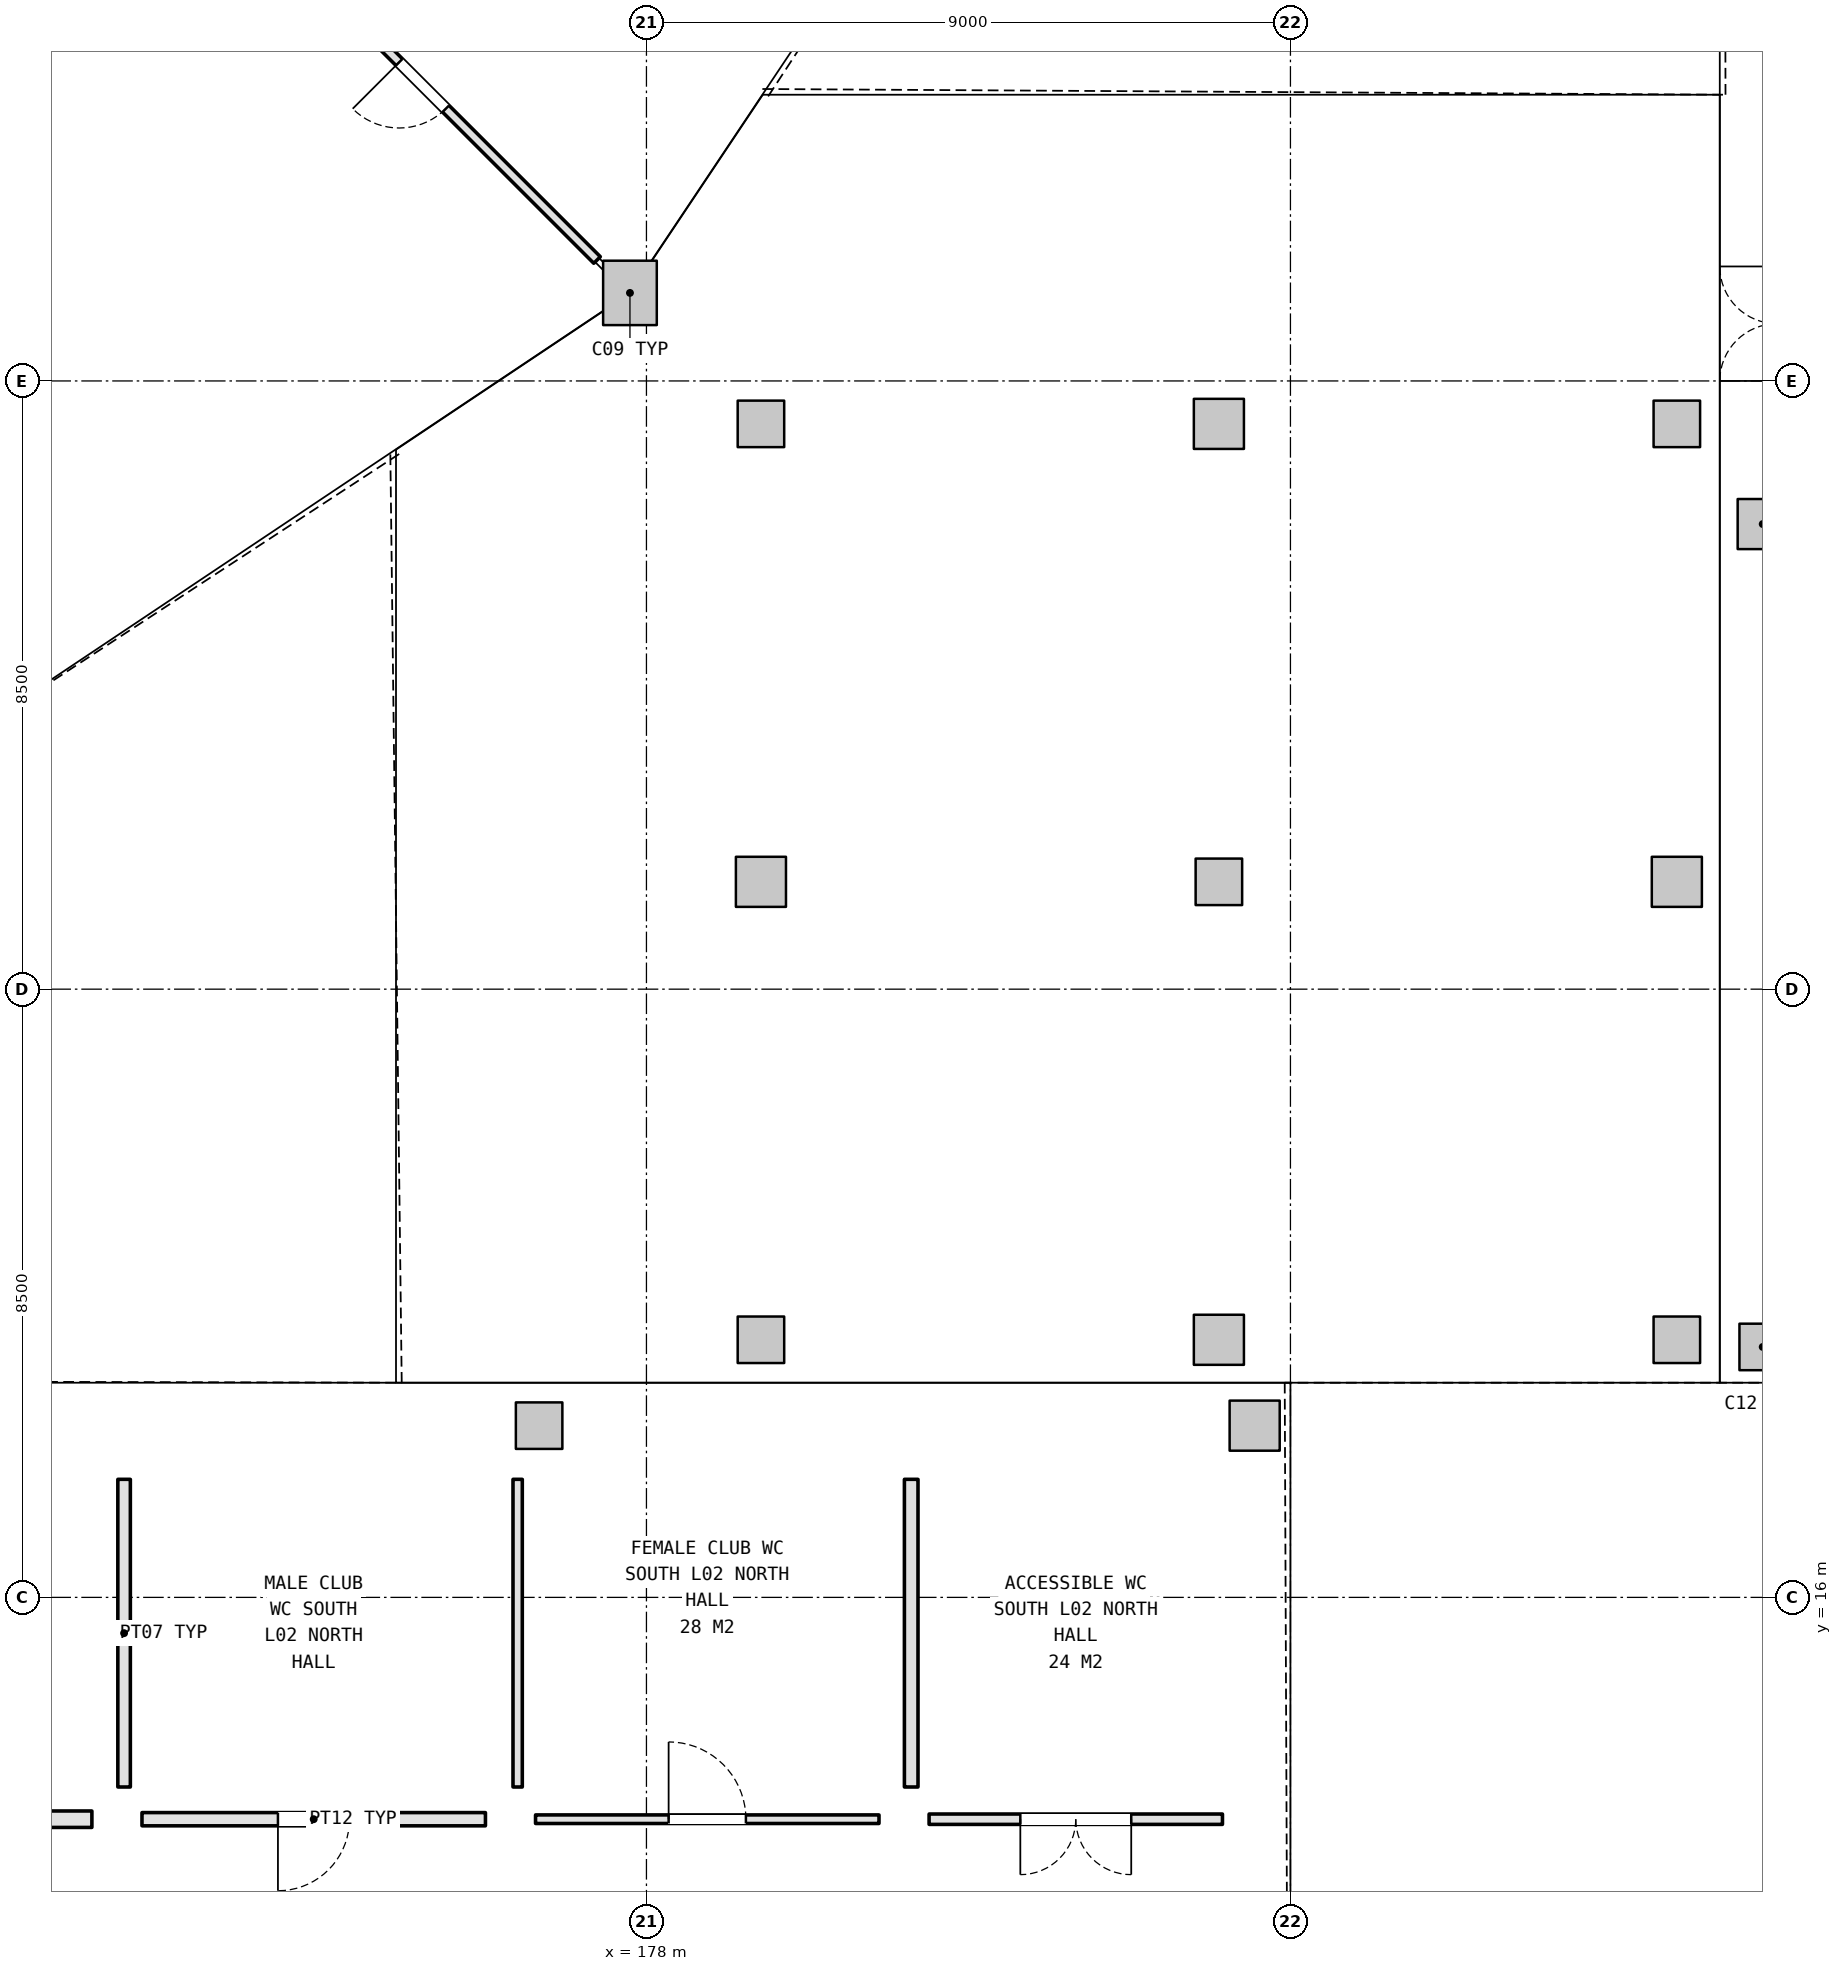
"""IFC4 building model, lengths in metres.
Left out: names, types, materials, properties, quantities, classifications, styles, units other than length and angle.
Written with IfcOpenShell. Run it as: python <this file> out.ifc"""

import sys

from ifc_helpers import new_model, si_unit, direction, frame, frame_2d, origin, origin_2d, place, context, subcontext, project, spatial, rectangle, extrude, element, fill, save


model = new_model("IFC4")
c1 = context("Model", 3, precision=1e-05, world=origin(), true_north=direction((0.0, 1.0)))
c2 = subcontext(c1, "Body", "Model", "MODEL_VIEW")
j1 = project(units=[si_unit("LENGTHUNIT", "METRE"), si_unit("PLANEANGLEUNIT", "RADIAN")], contexts=[c1])
p1 = place(None, origin())
s1 = spatial("IfcSite", under=j1, at=p1, CompositionType="ELEMENT")
p2 = place(p1, origin())
s2 = spatial("IfcBuilding", under=s1, at=p2, CompositionType="ELEMENT")
p3 = place(p2, frame((0.0, 0.0, 10.8)))
s3 = spatial("IfcBuildingStorey", under=s2, at=p3, CompositionType="ELEMENT", Elevation=10.8)
p4 = place(p3, frame((177.77, 34.23, 0.0), z_axis=(0.0, 0.0, 1.0), x_axis=(1.0, 0.0, 0.0)))
e1 = element("IfcColumn", 1, at=p4, inside=s3, PredefinedType="COLUMN", context=c2, shape_type="SweptSolid", body=[
    extrude(rectangle(XDim=0.75, YDim=0.9, at=origin_2d()), origin(), (0.0, 0.0, 1.0), 5.4),
])
p5 = place(p3, frame((193.6, 19.5, 0.0), z_axis=(0.0, 0.0, 1.0), x_axis=(1.0, 0.0, 0.0)))
e2 = element("IfcColumn", 2, at=p5, inside=s3, PredefinedType="COLUMN", context=c2, shape_type="SweptSolid", body=[
    extrude(rectangle(XDim=0.65, YDim=0.65, at=origin_2d()), origin(), (0.0, 0.0, 1.0), 5.4),
])
p6 = place(p3, frame((193.6, 31.0, 0.0), z_axis=(0.0, 0.0, 1.0), x_axis=(1.0, 0.0, 0.0)))
e3 = element("IfcColumn", 3, at=p6, inside=s3, PredefinedType="COLUMN", context=c2, shape_type="SweptSolid", body=[
    extrude(rectangle(XDim=0.7, YDim=0.7, at=origin_2d()), origin(), (0.0, 0.0, 1.0), 5.4),
])
p7 = place(p3, frame((176.5, 18.4, 0.0), z_axis=(0.0, 0.0, 1.0), x_axis=(1.0, 0.0, 0.0)))
e4 = element("IfcColumn", 4, at=p7, inside=s3, PredefinedType="COLUMN", context=c2, shape_type="SweptSolid", body=[
    extrude(rectangle(XDim=0.65, YDim=0.65, at=origin_2d()), origin(), (0.0, 0.0, 1.0), 5.4),
])
p8 = place(p3, frame((186.5, 18.4, 0.0), z_axis=(0.0, 0.0, 1.0), x_axis=(1.0, 0.0, 0.0)))
e5 = element("IfcColumn", 5, at=p8, inside=s3, PredefinedType="COLUMN", context=c2, shape_type="SweptSolid", body=[
    extrude(rectangle(XDim=0.7, YDim=0.7, at=origin_2d()), origin(), (0.0, 0.0, 1.0), 5.4),
])
p9 = place(p3, frame((179.6, 19.6, 0.0), z_axis=(0.0, 0.0, 1.0), x_axis=(1.0, 0.0, 0.0)))
e6 = element("IfcColumn", 6, at=p9, inside=s3, PredefinedType="COLUMN", context=c2, shape_type="SweptSolid", body=[
    extrude(rectangle(XDim=0.65, YDim=0.65, at=origin_2d()), origin(), (0.0, 0.0, 1.0), 5.4),
])
p10 = place(p3, frame((179.6, 26.0, 0.0), z_axis=(0.0, 0.0, 1.0), x_axis=(1.0, 0.0, 0.0)))
e7 = element("IfcColumn", 7, at=p10, inside=s3, PredefinedType="COLUMN", context=c2, shape_type="SweptSolid", body=[
    extrude(rectangle(XDim=0.7, YDim=0.7, at=origin_2d()), origin(), (0.0, 0.0, 1.0), 5.4),
])
p11 = place(p3, frame((179.6, 32.4, 0.0), z_axis=(0.0, 0.0, 1.0), x_axis=(1.0, 0.0, 0.0)))
e8 = element("IfcColumn", 8, at=p11, inside=s3, PredefinedType="COLUMN", context=c2, shape_type="SweptSolid", body=[
    extrude(rectangle(XDim=0.65, YDim=0.65, at=origin_2d()), origin(), (0.0, 0.0, 1.0), 5.4),
])
p12 = place(p3, frame((186.0, 19.6, 0.0), z_axis=(0.0, 0.0, 1.0), x_axis=(1.0, 0.0, 0.0)))
e9 = element("IfcColumn", 9, at=p12, inside=s3, PredefinedType="COLUMN", context=c2, shape_type="SweptSolid", body=[
    extrude(rectangle(XDim=0.7, YDim=0.7, at=origin_2d()), origin(), (0.0, 0.0, 1.0), 5.4),
])
p13 = place(p3, frame((186.0, 26.0, 0.0), z_axis=(0.0, 0.0, 1.0), x_axis=(1.0, 0.0, 0.0)))
e10 = element("IfcColumn", 10, at=p13, inside=s3, PredefinedType="COLUMN", context=c2, shape_type="SweptSolid", body=[
    extrude(rectangle(XDim=0.65, YDim=0.65, at=origin_2d()), origin(), (0.0, 0.0, 1.0), 5.4),
])
p14 = place(p3, frame((186.0, 32.4, 0.0), z_axis=(0.0, 0.0, 1.0), x_axis=(1.0, 0.0, 0.0)))
e11 = element("IfcColumn", 11, at=p14, inside=s3, PredefinedType="COLUMN", context=c2, shape_type="SweptSolid", body=[
    extrude(rectangle(XDim=0.7, YDim=0.7, at=origin_2d()), origin(), (0.0, 0.0, 1.0), 5.4),
])
p15 = place(p3, frame((192.4, 19.6, 0.0), z_axis=(0.0, 0.0, 1.0), x_axis=(1.0, 0.0, 0.0)))
e12 = element("IfcColumn", 12, at=p15, inside=s3, PredefinedType="COLUMN", context=c2, shape_type="SweptSolid", body=[
    extrude(rectangle(XDim=0.65, YDim=0.65, at=origin_2d()), origin(), (0.0, 0.0, 1.0), 5.4),
])
p16 = place(p3, frame((192.4, 26.0, 0.0), z_axis=(0.0, 0.0, 1.0), x_axis=(1.0, 0.0, 0.0)))
e13 = element("IfcColumn", 13, at=p16, inside=s3, PredefinedType="COLUMN", context=c2, shape_type="SweptSolid", body=[
    extrude(rectangle(XDim=0.7, YDim=0.7, at=origin_2d()), origin(), (0.0, 0.0, 1.0), 5.4),
])
p17 = place(p3, frame((192.4, 32.4, 0.0), z_axis=(0.0, 0.0, 1.0), x_axis=(1.0, 0.0, 0.0)))
e14 = element("IfcColumn", 14, at=p17, inside=s3, PredefinedType="COLUMN", context=c2, shape_type="SweptSolid", body=[
    extrude(rectangle(XDim=0.65, YDim=0.65, at=origin_2d()), origin(), (0.0, 0.0, 1.0), 5.4),
])
p18 = place(p3, frame((170.25, 12.9, 0.0), z_axis=(0.0, 0.0, 1.0), x_axis=(-1.0, 0.0, 0.0)))
e15 = element("IfcWall", 15, at=p18, inside=s3, PredefinedType="PLUMBINGWALL", context=c2, shape_type="SweptSolid", body=[
    extrude(rectangle(XDim=13.3, YDim=0.23, at=frame_2d((6.65, 0.0))), origin(), (0.0, 0.0, 1.0), 4.435),
])
p19 = place(p18, frame((6.14, 0.0, 0.0)))
e16 = element("IfcOpeningElement", 16, at=p19, cuts=e15, PredefinedType="OPENING", context=c2, shape_type="SweptSolid", body=[
    extrude(rectangle(XDim=1.02, YDim=2.15, at=frame_2d((0.51, 1.075))), frame((0.0, 0.125, 0.0), z_axis=(0.0, -1.0, 0.0), x_axis=(1.0, 0.0, 0.0)), (0.0, 0.0, 1.0), 0.25),
])
p20 = place(p3, frame((175.75, 12.9, 0.0), z_axis=(0.0, 0.0, 1.0), x_axis=(-1.0, 0.0, 0.0)))
e17 = element("IfcWall", 17, at=p20, inside=s3, PredefinedType="PARTITIONING", context=c2, shape_type="SweptSolid", body=[
    extrude(rectangle(XDim=4.8, YDim=0.185, at=frame_2d((2.4, 0.0))), origin(), (0.0, 0.0, 1.0), 5.12),
])
p21 = place(p20, frame((1.9, 0.0, 0.0)))
e18 = element("IfcOpeningElement", 18, at=p21, cuts=e17, PredefinedType="OPENING", context=c2, shape_type="SweptSolid", body=[
    extrude(rectangle(XDim=1.0, YDim=2.15, at=frame_2d((0.5, 1.075))), frame((0.0, 0.103, 0.0), z_axis=(0.0, -1.0, 0.0), x_axis=(1.0, 0.0, 0.0)), (0.0, 0.0, 1.0), 0.205),
])
p22 = place(p3, frame((170.7, 13.35, 0.0), z_axis=(0.0, 0.0, 1.0), x_axis=(0.0, 1.0, 0.0)))
e19 = element("IfcWall", 19, at=p22, inside=s3, PredefinedType="PARTITIONING", context=c2, shape_type="SweptSolid", body=[
    extrude(rectangle(XDim=4.3, YDim=0.175, at=frame_2d((2.15, 0.0))), origin(), (0.0, 0.0, 1.0), 4.635),
])
p23 = place(p3, frame((181.25, 12.9, 0.0), z_axis=(0.0, 0.0, 1.0), x_axis=(-1.0, 0.0, 0.0)))
e20 = element("IfcWall", 20, at=p23, inside=s3, PredefinedType="PARTITIONING", context=c2, shape_type="SweptSolid", body=[
    extrude(rectangle(XDim=4.8, YDim=0.12, at=frame_2d((2.4, 0.0))), origin(), (0.0, 0.0, 1.0), 4.435),
])
p24 = place(p23, frame((1.86, 0.0, 0.0)))
e21 = element("IfcOpeningElement", 21, at=p24, cuts=e20, PredefinedType="OPENING", context=c2, shape_type="SweptSolid", body=[
    extrude(rectangle(XDim=1.08, YDim=2.25, at=frame_2d((0.54, 1.125))), frame((0.0, 0.07, 0.0), z_axis=(0.0, -1.0, 0.0), x_axis=(1.0, 0.0, 0.0)), (0.0, 0.0, 1.0), 0.14),
])
p25 = place(p3, frame((176.2, 13.35, 0.0), z_axis=(0.0, 0.0, 1.0), x_axis=(0.0, 1.0, 0.0)))
e22 = element("IfcWall", 22, at=p25, inside=s3, PredefinedType="PARTITIONING", context=c2, shape_type="SweptSolid", body=[
    extrude(rectangle(XDim=4.3, YDim=0.13, at=frame_2d((2.15, 0.0))), origin(), (0.0, 0.0, 1.0), 4.435),
])
p26 = place(p3, frame((186.05, 12.9, 0.0), z_axis=(0.0, 0.0, 1.0), x_axis=(-1.0, 0.0, 0.0)))
e23 = element("IfcWall", 23, at=p26, inside=s3, PredefinedType="PARTITIONING", context=c2, shape_type="SweptSolid", body=[
    extrude(rectangle(XDim=4.1, YDim=0.145, at=frame_2d((2.05, 0.0))), origin(), (0.0, 0.0, 1.0), 5.12),
])
p27 = place(p26, frame((1.275, 0.0, 0.0)))
e24 = element("IfcOpeningElement", 24, at=p27, cuts=e23, PredefinedType="OPENING", context=c2, shape_type="SweptSolid", body=[
    extrude(rectangle(XDim=1.55, YDim=2.15, at=frame_2d((0.775, 1.075))), frame((0.0, 0.083, 0.0), z_axis=(0.0, -1.0, 0.0), x_axis=(1.0, 0.0, 0.0)), (0.0, 0.0, 1.0), 0.165),
])
p28 = place(p3, frame((181.7, 13.35, 0.0), z_axis=(0.0, 0.0, 1.0), x_axis=(0.0, 1.0, 0.0)))
e25 = element("IfcWall", 25, at=p28, inside=s3, PredefinedType="PARTITIONING", context=c2, shape_type="SweptSolid", body=[
    extrude(rectangle(XDim=4.3, YDim=0.19, at=frame_2d((2.15, 0.0))), origin(), (0.0, 0.0, 1.0), 4.635),
])
p29 = place(p3, frame((172.431, 39.569, 0.0), z_axis=(0.0, 0.0, 1.0), x_axis=(0.707106781187, -0.707106781187, 0.0)))
e26 = element("IfcWall", 26, at=p29, inside=s3, PredefinedType="PARTITIONING", context=c2, shape_type="SweptSolid", body=[
    extrude(rectangle(XDim=6.9, YDim=0.13, at=frame_2d((3.45, 0.0))), origin(), (0.0, 0.0, 1.0), 4.215),
])
p30 = place(p29, frame((2.99, 0.0, 0.0)))
e27 = element("IfcOpeningElement", 27, at=p30, cuts=e26, PredefinedType="OPENING", context=c2, shape_type="SweptSolid", body=[
    extrude(rectangle(XDim=0.92, YDim=2.1, at=frame_2d((0.46, 1.05))), frame((0.0, 0.075, 0.0), z_axis=(0.0, -1.0, 0.0), x_axis=(1.0, 0.0, 0.0)), (0.0, 0.0, 1.0), 0.15),
])
p31 = place(p3, frame((158.322, 30.437, 0.0), z_axis=(0.0, 0.0, 1.0), x_axis=(0.831469365384, 0.555570602559, 0.0)))
e28 = element("IfcWall", 28, at=p31, inside=s3, PredefinedType="PARTITIONING", context=c2, shape_type="SweptSolid", body=[
    extrude(rectangle(XDim=16.306, YDim=0.19, at=frame_2d((8.153, 0.0))), origin(), (0.0, 0.0, 1.0), 5.12),
])
p32 = place(p21, origin())
e29 = element("IfcDoor", 29, at=p32, inside=s3, OperationType="SINGLE_SWING_RIGHT", PredefinedType="DOOR", context=c2, shape_type="SweptSolid", body=[
    extrude(rectangle(XDim=1.0, YDim=2.15, at=frame_2d((0.5, 1.075))), frame((0.0, 0.025, 0.0), z_axis=(0.0, -1.0, 0.0), x_axis=(1.0, 0.0, 0.0)), (0.0, 0.0, 1.0), 0.05),
])
fill(e18, e29)
p33 = place(p24, frame((1.08, 0.0, 0.0), z_axis=(0.0, 0.0, 1.0), x_axis=(-1.0, 0.0, 0.0)))
e30 = element("IfcDoor", 30, at=p33, inside=s3, OperationType="SINGLE_SWING_RIGHT", PredefinedType="DOOR", context=c2, shape_type="SweptSolid", body=[
    extrude(rectangle(XDim=1.08, YDim=2.25, at=frame_2d((0.54, 1.125))), frame((0.0, 0.025, 0.0), z_axis=(0.0, -1.0, 0.0), x_axis=(1.0, 0.0, 0.0)), (0.0, 0.0, 1.0), 0.05),
])
fill(e21, e30)
p34 = place(p27, origin())
e31 = element("IfcDoor", 31, at=p34, inside=s3, OperationType="DOUBLE_DOOR_SINGLE_SWING", PredefinedType="DOOR", context=c2, shape_type="SweptSolid", body=[
    extrude(rectangle(XDim=1.55, YDim=2.15, at=frame_2d((0.775, 1.075))), frame((0.0, 0.025, 0.0), z_axis=(0.0, -1.0, 0.0), x_axis=(1.0, 0.0, 0.0)), (0.0, 0.0, 1.0), 0.05),
])
fill(e24, e31)
p35 = place(p30, frame((0.92, 0.0, 0.0), z_axis=(0.0, 0.0, 1.0), x_axis=(-1.0, 0.0, 0.0)))
e32 = element("IfcDoor", 32, at=p35, inside=s3, OperationType="SINGLE_SWING_LEFT", PredefinedType="DOOR", context=c2, shape_type="SweptSolid", body=[
    extrude(rectangle(XDim=0.92, YDim=2.1, at=frame_2d((0.46, 1.05))), frame((0.0, 0.025, 0.0), z_axis=(0.0, -1.0, 0.0), x_axis=(1.0, 0.0, 0.0)), (0.0, 0.0, 1.0), 0.05),
])
fill(e27, e32)
save(model, sys.argv[1])
